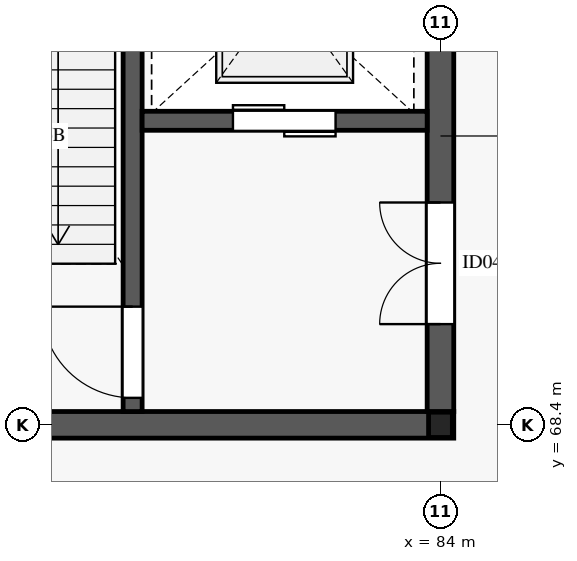
"""IFC4 building model, lengths in metres.
Left out: names, types, materials, properties, quantities, classifications, styles, units other than length and angle.
Written with IfcOpenShell. Run it as: python <this file> out.ifc"""

import sys

from ifc_helpers import new_model, si_unit, direction, frame, frame_2d, origin, origin_2d, place, context, subcontext, project, spatial, rectangle, i_section, extrude, element, fill, save


model = new_model("IFC4")
c1 = context("Model", 3, precision=1e-05, world=origin(), true_north=direction((0.0, 1.0)))
c2 = subcontext(c1, "Body", "Model", "MODEL_VIEW")
j1 = project(units=[si_unit("LENGTHUNIT", "METRE"), si_unit("PLANEANGLEUNIT", "RADIAN")], contexts=[c1])
p1 = place(None, origin())
s1 = spatial("IfcSite", under=j1, at=p1, CompositionType="ELEMENT")
p2 = place(p1, origin())
s2 = spatial("IfcBuilding", under=s1, at=p2, CompositionType="ELEMENT")
p3 = place(p2, frame((0.0, 0.0, 15.6)))
s3 = spatial("IfcBuildingStorey", under=s2, at=p3, CompositionType="ELEMENT", Elevation=15.6)
p4 = place(p3, frame((84.0, 68.4, 0.0), z_axis=(0.0, 0.0, 1.0), x_axis=(1.0, 0.0, 0.0)))
e1 = element("IfcColumn", 1, at=p4, inside=s3, PredefinedType="COLUMN", context=c2, shape_type="SweptSolid", body=[
    extrude(i_section(OverallWidth=0.313, OverallDepth=0.333, WebThickness=0.018, FlangeThickness=0.028, FilletRadius=0.015, at=origin_2d()), origin(), (0.0, 0.0, 1.0), 4.59),
])
p5 = place(p3, frame((75.825, 68.4, 0.0), z_axis=(0.0, 0.0, 1.0), x_axis=(1.0, 0.0, 0.0)))
e2 = element("IfcWall", 2, at=p5, inside=s3, PredefinedType="SHEAR", context=c2, shape_type="SweptSolid", body=[
    extrude(rectangle(XDim=8.35, YDim=0.35, at=frame_2d((4.175, 0.0))), origin(), (0.0, 0.0, 1.0), 4.59),
])
p6 = place(p3, frame((84.0, 68.575, 0.0), z_axis=(0.0, 0.0, 1.0), x_axis=(0.0, 1.0, 0.0)))
e3 = element("IfcWall", 3, at=p6, inside=s3, PredefinedType="SHEAR", context=c2, shape_type="SweptSolid", body=[
    extrude(rectangle(XDim=7.25, YDim=0.35, at=frame_2d((3.625, 0.0))), origin(), (0.0, 0.0, 1.0), 4.59),
])
p7 = place(p6, frame((1.15, 0.0, 0.0)))
e4 = element("IfcOpeningElement", 4, at=p7, cuts=e3, PredefinedType="OPENING", context=c2, shape_type="SweptSolid", body=[
    extrude(rectangle(XDim=1.6, YDim=2.35, at=frame_2d((0.8, 1.175))), frame((0.0, 0.185, 0.0), z_axis=(0.0, -1.0, 0.0), x_axis=(1.0, 0.0, 0.0)), (0.0, 0.0, 1.0), 0.37),
])
p8 = place(p3, frame((79.95, 68.575, 0.0), z_axis=(0.0, 0.0, 1.0), x_axis=(0.0, 1.0, 0.0)))
e5 = element("IfcWall", 5, at=p8, inside=s3, PredefinedType="SHEAR", context=c2, shape_type="SweptSolid", body=[
    extrude(rectangle(XDim=7.25, YDim=0.25, at=frame_2d((3.625, 0.0))), origin(), (0.0, 0.0, 1.0), 4.59),
])
p9 = place(p8, frame((0.18, 0.0, 0.0)))
e6 = element("IfcOpeningElement", 6, at=p9, cuts=e5, PredefinedType="OPENING", context=c2, shape_type="SweptSolid", body=[
    extrude(rectangle(XDim=1.2, YDim=2.2, at=frame_2d((0.6, 1.1))), frame((0.0, 0.135, 0.0), z_axis=(0.0, -1.0, 0.0), x_axis=(1.0, 0.0, 0.0)), (0.0, 0.0, 1.0), 0.27),
])
p10 = place(p3, frame((80.075, 72.4, 0.0), z_axis=(0.0, 0.0, 1.0), x_axis=(1.0, 0.0, 0.0)))
e7 = element("IfcWall", 7, at=p10, inside=s3, PredefinedType="SHEAR", context=c2, shape_type="SweptSolid", body=[
    extrude(rectangle(XDim=3.75, YDim=0.25, at=frame_2d((1.875, 0.0))), origin(), (0.0, 0.0, 1.0), 4.59),
])
p11 = place(p10, frame((1.195, 0.0, 0.0)))
e8 = element("IfcOpeningElement", 8, at=p11, cuts=e7, PredefinedType="OPENING", context=c2, shape_type="SweptSolid", body=[
    extrude(rectangle(XDim=1.35, YDim=2.2, at=frame_2d((0.675, 1.1))), frame((0.0, 0.135, 0.0), z_axis=(0.0, -1.0, 0.0), x_axis=(1.0, 0.0, 0.0)), (0.0, 0.0, 1.0), 0.27),
])
p12 = place(p9, origin())
e9 = element("IfcDoor", 9, at=p12, inside=s3, OperationType="SINGLE_SWING_RIGHT", PredefinedType="DOOR", context=c2, shape_type="SweptSolid", body=[
    extrude(rectangle(XDim=1.2, YDim=2.2, at=frame_2d((0.6, 1.1))), frame((0.0, 0.025, 0.0), z_axis=(0.0, -1.0, 0.0), x_axis=(1.0, 0.0, 0.0)), (0.0, 0.0, 1.0), 0.05),
])
fill(e6, e9)
p13 = place(p7, origin())
e10 = element("IfcDoor", 10, at=p13, inside=s3, OperationType="DOUBLE_DOOR_SINGLE_SWING", PredefinedType="DOOR", context=c2, shape_type="SweptSolid", body=[
    extrude(rectangle(XDim=1.6, YDim=2.35, at=frame_2d((0.8, 1.175))), frame((0.0, 0.025, 0.0), z_axis=(0.0, -1.0, 0.0), x_axis=(1.0, 0.0, 0.0)), (0.0, 0.0, 1.0), 0.05),
])
fill(e4, e10)
p14 = place(p11, origin())
e11 = element("IfcDoor", 11, at=p14, inside=s3, OperationType="DOUBLE_DOOR_SLIDING", PredefinedType="DOOR", context=c2, shape_type="SweptSolid", body=[
    extrude(rectangle(XDim=1.35, YDim=2.2, at=frame_2d((0.675, 1.1))), frame((0.0, 0.025, 0.0), z_axis=(0.0, -1.0, 0.0), x_axis=(1.0, 0.0, 0.0)), (0.0, 0.0, 1.0), 0.05),
])
fill(e8, e11)
save(model, sys.argv[1])
